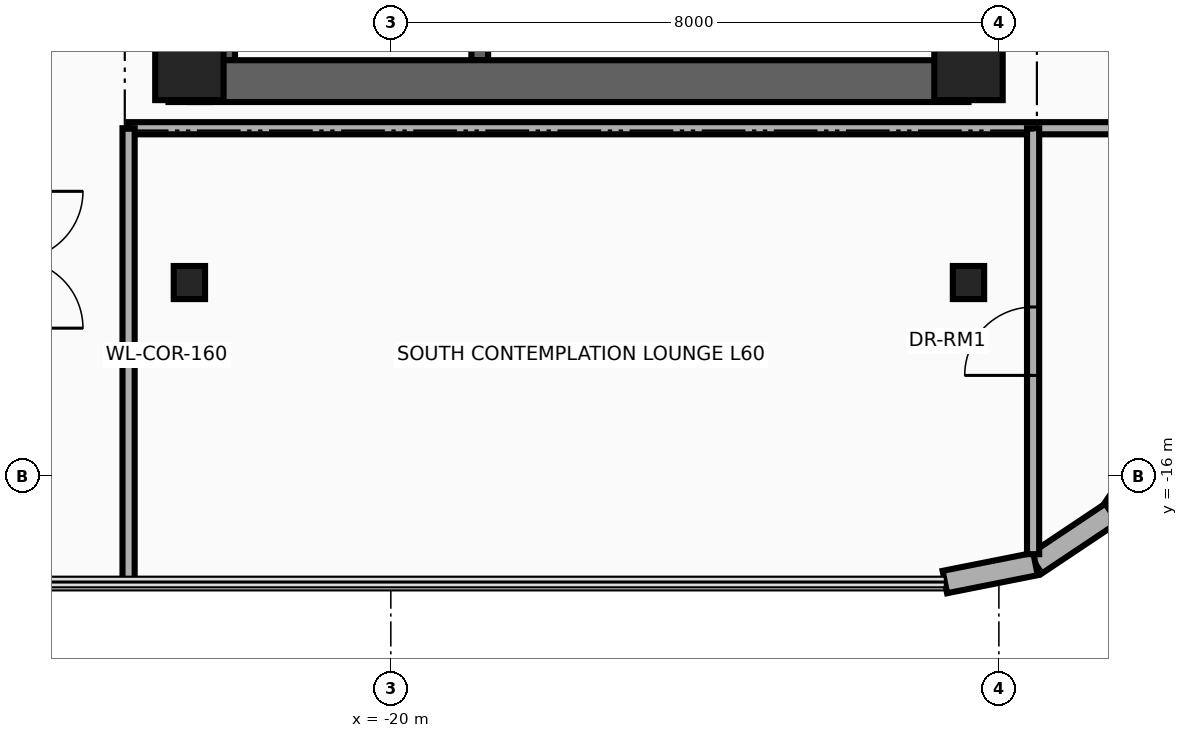
"""IFC4 building model, lengths in metres.
Left out: names, types, materials, properties, quantities, classifications, styles, units other than length and angle.
Written with IfcOpenShell. Run it as: python <this file> out.ifc"""

import sys

from ifc_helpers import new_model, si_unit, direction, frame, frame_2d, origin, origin_2d, place, context, subcontext, project, spatial, rectangle, i_section, extrude, source, transform, mapped, element, fill, save


model = new_model("IFC4")
c1 = context("Model", 3, precision=1e-05, world=origin(), true_north=direction((0.0, 1.0)))
c2 = subcontext(c1, "Body", "Model", "MODEL_VIEW")
j1 = project(units=[si_unit("LENGTHUNIT", "METRE"), si_unit("PLANEANGLEUNIT", "RADIAN")], contexts=[c1])
p1 = place(None, origin())
s1 = spatial("IfcSite", under=j1, at=p1, CompositionType="ELEMENT")
p2 = place(p1, origin())
s2 = spatial("IfcBuilding", under=s1, at=p2, CompositionType="ELEMENT")
p3 = place(p2, frame((0.0, 0.0, 233.5)))
s3 = spatial("IfcBuildingStorey", under=s2, at=p3, CompositionType="ELEMENT", Elevation=233.5)
for number, where, z_axis, x_axis in (
    (1, (-22.16, -10.525, 0.0), (0.0, 0.0, 1.0), (0.0, 1.0, 0.0)),
    (2, (-18.83, -10.525, 0.0), (0.0, 0.0, 1.0), (0.0, 1.0, 0.0)),
):
    element("IfcWall", number, at=place(p3, frame(where, z_axis=z_axis, x_axis=x_axis)), inside=s3, PredefinedType="SHEAR", context=c2, shape_type="SweptSolid", body=[
        extrude(rectangle(XDim=8.745, YDim=0.22, at=frame_2d((4.373, 0.0))), origin(), (0.0, 0.0, 1.0), 3.26),
    ])
p4 = place(p3, frame((-22.65, -11.075, 0.0), z_axis=(0.0, 0.0, 1.0), x_axis=(0.0, 1.0, 0.0)))
e3 = element("IfcWall", 3, at=p4, inside=s3, PredefinedType="SHEAR", context=c2, shape_type="SweptSolid", body=[
    extrude(rectangle(XDim=22.15, YDim=0.55, at=frame_2d((11.075, 0.0))), origin(), (0.0, 0.0, 1.0), 3.26),
])
p5 = place(p3, frame((-22.65, -10.8, 0.0), z_axis=(0.0, 0.0, 1.0), x_axis=(1.0, 0.0, 0.0)))
e4 = element("IfcWall", 4, at=p5, inside=s3, PredefinedType="SHEAR", context=c2, shape_type="SweptSolid", body=[
    extrude(rectangle(XDim=10.25, YDim=0.55, at=frame_2d((5.125, 0.0))), origin(), (0.0, 0.0, 1.0), 3.26),
])
m1 = source(origin(), c2, "Body", "SweptSolid", [
    extrude(rectangle(XDim=0.9, YDim=0.9, at=origin_2d()), origin(), (0.0, 0.0, 1.0), 3.5),
])
for number, where, z_axis, x_axis in (
    (5, (-22.65, -10.6, 0.0), (0.0, 0.0, 1.0), (1.0, 0.0, 0.0)),
    (6, (-12.4, -10.6, 0.0), (0.0, 0.0, 1.0), (1.0, 0.0, 0.0)),
):
    element("IfcColumn", number, at=place(p3, frame(where, z_axis=z_axis, x_axis=x_axis)), inside=s3, PredefinedType="COLUMN", context=c2, shape_type="MappedRepresentation", body=[
        mapped(m1, transform((0.0, 0.0, 0.0), x_axis=(1.0, 0.0, 0.0), y_axis=(0.0, 1.0, 0.0), z_axis=(0.0, 0.0, 1.0), scale=1.0)),
    ])
m2 = source(origin(), c2, "Body", "SweptSolid", [
    extrude(i_section(OverallWidth=0.412, OverallDepth=0.435, WebThickness=0.036, FlangeThickness=0.057, at=origin_2d()), origin(), (0.0, 0.0, 1.0), 3.5),
])
for number, where, z_axis, x_axis in (
    (7, (-22.65, -13.45, 0.0), (0.0, 0.0, 1.0), (1.0, 0.0, 0.0)),
    (8, (-12.4, -13.45, 0.0), (0.0, 0.0, 1.0), (1.0, 0.0, 0.0)),
):
    element("IfcColumn", number, at=place(p3, frame(where, z_axis=z_axis, x_axis=x_axis)), inside=s3, PredefinedType="COLUMN", context=c2, shape_type="MappedRepresentation", body=[
        mapped(m2, transform((0.0, 0.0, 0.0), x_axis=(1.0, 0.0, 0.0), y_axis=(0.0, 1.0, 0.0), z_axis=(0.0, 0.0, 1.0), scale=1.0)),
    ])
for number, where, z_axis, x_axis in (
    (9, (-9.847, -15.482, 0.0), (0.0, 0.0, 1.0), (-0.556, -0.831, 0.0)),
    (10, (-10.517, -16.483, 0.0), (0.0, 0.0, 1.0), (-0.831, -0.556, 0.0)),
):
    element("IfcWall", number, at=place(p3, frame(where, z_axis=z_axis, x_axis=x_axis)), inside=s3, PredefinedType="SOLIDWALL", context=c2, shape_type="SweptSolid", body=[
        extrude(rectangle(XDim=1.205, YDim=0.3, at=frame_2d((0.603, 0.0))), origin(), (0.0, 0.0, 1.0), 3.26),
    ])
p6 = place(p3, frame((-11.518, -17.153, 0.0), z_axis=(0.0, 0.0, 1.0), x_axis=(-0.980804027463, -0.194996050505, 0.0)))
e11 = element("IfcWall", 11, at=p6, inside=s3, PredefinedType="SOLIDWALL", context=c2, shape_type="SweptSolid", body=[
    extrude(rectangle(XDim=1.216, YDim=0.3, at=frame_2d((0.608, 0.0))), origin(), (0.0, 0.0, 1.0), 3.26),
])
p7 = place(p3, frame((-23.45, -11.42, 0.0), z_axis=(0.0, 0.0, 1.0), x_axis=(1.0, 0.0, 0.0)))
e12 = element("IfcWall", 12, at=p7, inside=s3, PredefinedType="PARTITIONING", context=c2, shape_type="SweptSolid", body=[
    extrude(rectangle(XDim=13.84, YDim=0.16, at=frame_2d((6.92, 0.0))), origin(), (0.0, 0.0, 1.0), 2.634),
])
p8 = place(p3, frame((-23.45, -17.39, 0.0), z_axis=(0.0, 0.0, 1.0), x_axis=(0.0, 1.0, 0.0)))
e13 = element("IfcWall", 13, at=p8, inside=s3, PredefinedType="PARTITIONING", context=c2, shape_type="SweptSolid", body=[
    extrude(rectangle(XDim=5.97, YDim=0.16, at=frame_2d((2.985, 0.0))), origin(), (0.0, 0.0, 1.0), 3.26),
])
p9 = place(p3, frame((-11.55, -17.024, 0.0), z_axis=(0.0, 0.0, 1.0), x_axis=(0.0, 1.0, 0.0)))
e14 = element("IfcWall", 14, at=p9, inside=s3, PredefinedType="PARTITIONING", context=c2, shape_type="SweptSolid", body=[
    extrude(rectangle(XDim=5.604, YDim=0.16, at=frame_2d((2.802, 0.0))), origin(), (0.0, 0.0, 1.0), 3.26),
])
p10 = place(p9, frame((2.352, 0.0, 0.0)))
e15 = element("IfcOpeningElement", 15, at=p10, cuts=e14, PredefinedType="OPENING", context=c2, shape_type="SweptSolid", body=[
    extrude(rectangle(XDim=0.9, YDim=2.1, at=frame_2d((0.45, 1.05))), frame((0.0, 0.095, 0.0), z_axis=(0.0, -1.0, 0.0), x_axis=(1.0, 0.0, 0.0)), (0.0, 0.0, 1.0), 0.19),
])
p11 = place(p10, origin())
e16 = element("IfcDoor", 16, at=p11, inside=s3, OperationType="SINGLE_SWING_RIGHT", PredefinedType="DOOR", context=c2, shape_type="SweptSolid", body=[
    extrude(rectangle(XDim=0.9, YDim=2.1, at=frame_2d((0.45, 1.05))), frame((0.0, 0.025, 0.0), z_axis=(0.0, -1.0, 0.0), x_axis=(1.0, 0.0, 0.0)), (0.0, 0.0, 1.0), 0.05),
])
fill(e15, e16)
save(model, sys.argv[1])
